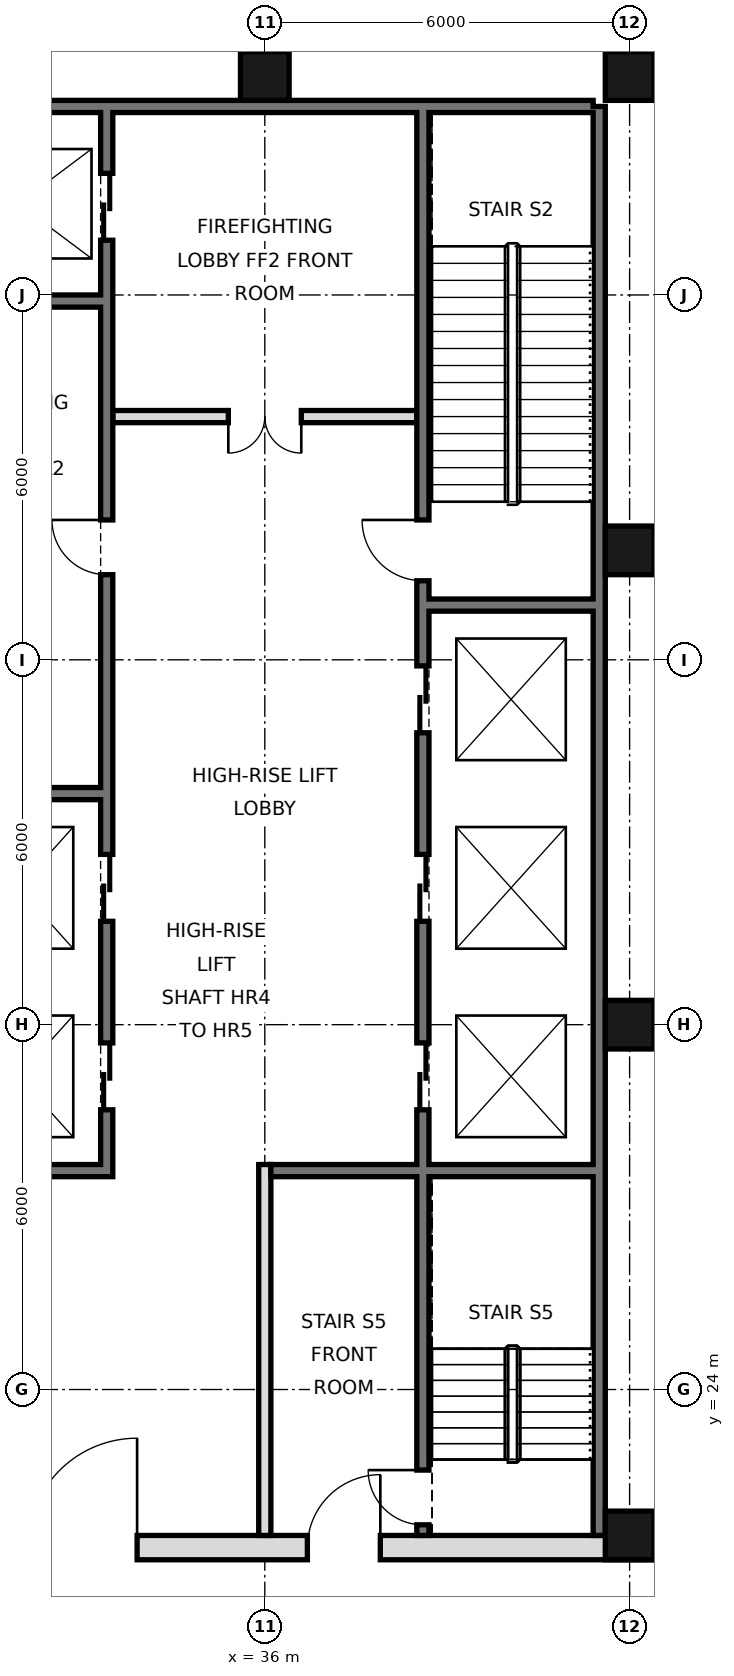
"""IFC4 building model, lengths in metres.
Left out: names, types, materials, properties, quantities, classifications, styles, units other than length and angle.
Written with IfcOpenShell. Run it as: python <this file> out.ifc"""

import sys

from ifc_helpers import new_model, si_unit, direction, frame, frame_2d, origin, origin_2d, place, context, subcontext, project, spatial, rectangle, hollow_rectangle, extrude, element, fill, save


model = new_model("IFC4")
c1 = context("Model", 3, precision=1e-05, world=origin(), true_north=direction((0.0, 1.0)))
c2 = subcontext(c1, "Body", "Model", "MODEL_VIEW")
j1 = project(units=[si_unit("LENGTHUNIT", "METRE"), si_unit("PLANEANGLEUNIT", "RADIAN")], contexts=[c1])
p1 = place(None, origin())
s1 = spatial("IfcSite", under=j1, at=p1, CompositionType="ELEMENT")
p2 = place(p1, origin())
s2 = spatial("IfcBuilding", under=s1, at=p2, CompositionType="ELEMENT")
p3 = place(p2, frame((0.0, 0.0, 257.6)))
s3 = spatial("IfcBuildingStorey", under=s2, at=p3, CompositionType="ELEMENT", Elevation=257.6)
for number, where, z_axis, x_axis in (
    (1, (36.0, 45.6, 0.0), (0.0, 0.0, 1.0), (1.0, 0.0, 0.0)),
    (2, (42.0, 21.6, 0.0), (0.0, 0.0, 1.0), (1.0, 0.0, 0.0)),
    (3, (42.0, 30.0, 0.0), (0.0, 0.0, 1.0), (1.0, 0.0, 0.0)),
    (4, (42.0, 37.8, 0.0), (0.0, 0.0, 1.0), (1.0, 0.0, 0.0)),
    (5, (42.0, 45.6, 0.0), (0.0, 0.0, 1.0), (1.0, 0.0, 0.0)),
):
    element("IfcColumn", number, at=place(p3, frame(where, z_axis=z_axis, x_axis=x_axis)), inside=s3, PredefinedType="COLUMN", context=c2, shape_type="SweptSolid", body=[
        extrude(hollow_rectangle(XDim=0.8, YDim=0.8, WallThickness=0.032, at=origin_2d()), origin(), (0.0, 0.0, 1.0), 5.4),
    ])
p4 = place(p3, frame((41.5, 21.6, 0.0), z_axis=(0.0, 0.0, 1.0), x_axis=(0.0, 1.0, 0.0)))
e6 = element("IfcWall", 6, at=p4, inside=s3, PredefinedType="SOLIDWALL", context=c2, shape_type="SweptSolid", body=[
    extrude(rectangle(XDim=23.5, YDim=0.2, at=frame_2d((11.75, 0.0))), origin(), (0.0, 0.0, 1.0), 5.22),
])
p5 = place(p3, frame((6.6, 45.1, 0.0), z_axis=(0.0, 0.0, 1.0), x_axis=(1.0, 0.0, 0.0)))
e7 = element("IfcWall", 7, at=p5, inside=s3, PredefinedType="SOLIDWALL", context=c2, shape_type="SweptSolid", body=[
    extrude(rectangle(XDim=34.8, YDim=0.2, at=frame_2d((17.4, 0.0))), origin(), (0.0, 0.0, 1.0), 5.22),
])
p6 = place(p3, frame((5.6, 21.4, 0.0), z_axis=(0.0, 0.0, 1.0), x_axis=(1.0, 0.0, 0.0)))
e8 = element("IfcWall", 8, at=p6, inside=s3, PredefinedType="SOLIDWALL", context=c2, shape_type="SweptSolid", body=[
    extrude(rectangle(XDim=36.8, YDim=0.4, at=frame_2d((18.4, 0.0))), origin(), (0.0, 0.0, 1.0), 5.22),
])
p7 = place(p6, frame((8.5, 0.0, 0.0)))
e9 = element("IfcOpeningElement", 9, at=p7, cuts=e8, PredefinedType="OPENING", context=c2, shape_type="SweptSolid", body=[
    extrude(rectangle(XDim=1.8, YDim=2.1, at=frame_2d((0.9, 1.05))), frame((0.0, 0.21, 0.0), z_axis=(0.0, -1.0, 0.0), x_axis=(1.0, 0.0, 0.0)), (0.0, 0.0, 1.0), 0.42),
])
p8 = place(p6, frame((17.5, 0.0, 0.0)))
e10 = element("IfcOpeningElement", 10, at=p8, cuts=e8, PredefinedType="OPENING", context=c2, shape_type="SweptSolid", body=[
    extrude(rectangle(XDim=1.8, YDim=2.1, at=frame_2d((0.9, 1.05))), frame((0.0, 0.21, 0.0), z_axis=(0.0, -1.0, 0.0), x_axis=(1.0, 0.0, 0.0)), (0.0, 0.0, 1.0), 0.42),
])
p9 = place(p6, frame((26.5, 0.0, 0.0)))
e11 = element("IfcOpeningElement", 11, at=p9, cuts=e8, PredefinedType="OPENING", context=c2, shape_type="SweptSolid", body=[
    extrude(rectangle(XDim=1.8, YDim=2.1, at=frame_2d((0.9, 1.05))), frame((0.0, 0.21, 0.0), z_axis=(0.0, -1.0, 0.0), x_axis=(1.0, 0.0, 0.0)), (0.0, 0.0, 1.0), 0.42),
])
p10 = place(p6, frame((4.5, 0.0, 0.0)))
e12 = element("IfcOpeningElement", 12, at=p10, cuts=e8, PredefinedType="OPENING", context=c2, shape_type="SweptSolid", body=[
    extrude(rectangle(XDim=1.2, YDim=2.1, at=frame_2d((0.6, 1.05))), frame((0.0, 0.21, 0.0), z_axis=(0.0, -1.0, 0.0), x_axis=(1.0, 0.0, 0.0)), (0.0, 0.0, 1.0), 0.42),
])
p11 = place(p6, frame((31.1, 0.0, 0.0)))
e13 = element("IfcOpeningElement", 13, at=p11, cuts=e8, PredefinedType="OPENING", context=c2, shape_type="SweptSolid", body=[
    extrude(rectangle(XDim=1.2, YDim=2.1, at=frame_2d((0.6, 1.05))), frame((0.0, 0.21, 0.0), z_axis=(0.0, -1.0, 0.0), x_axis=(1.0, 0.0, 0.0)), (0.0, 0.0, 1.0), 0.42),
])
p12 = place(p3, frame((33.4, 27.5, 0.0), z_axis=(0.0, 0.0, 1.0), x_axis=(0.0, 1.0, 0.0)))
e14 = element("IfcWall", 14, at=p12, inside=s3, PredefinedType="SOLIDWALL", context=c2, shape_type="SweptSolid", body=[
    extrude(rectangle(XDim=17.5, YDim=0.2, at=frame_2d((8.75, 0.0))), origin(), (0.0, 0.0, 1.0), 5.22),
])
p13 = place(p12, frame((1.1, 0.0, 0.0)))
e15 = element("IfcOpeningElement", 15, at=p13, cuts=e14, PredefinedType="OPENING", context=c2, shape_type="SweptSolid", body=[
    extrude(rectangle(XDim=1.1, YDim=2.1, at=frame_2d((0.55, 1.05))), frame((0.0, 0.11, 0.0), z_axis=(0.0, -1.0, 0.0), x_axis=(1.0, 0.0, 0.0)), (0.0, 0.0, 1.0), 0.22),
])
p14 = place(p12, frame((4.2, 0.0, 0.0)))
e16 = element("IfcOpeningElement", 16, at=p14, cuts=e14, PredefinedType="OPENING", context=c2, shape_type="SweptSolid", body=[
    extrude(rectangle(XDim=1.1, YDim=2.1, at=frame_2d((0.55, 1.05))), frame((0.0, 0.11, 0.0), z_axis=(0.0, -1.0, 0.0), x_axis=(1.0, 0.0, 0.0)), (0.0, 0.0, 1.0), 0.22),
])
p15 = place(p12, frame((15.4, 0.0, 0.0)))
e17 = element("IfcOpeningElement", 17, at=p15, cuts=e14, PredefinedType="OPENING", context=c2, shape_type="SweptSolid", body=[
    extrude(rectangle(XDim=1.1, YDim=2.1, at=frame_2d((0.55, 1.05))), frame((0.0, 0.11, 0.0), z_axis=(0.0, -1.0, 0.0), x_axis=(1.0, 0.0, 0.0)), (0.0, 0.0, 1.0), 0.22),
])
p16 = place(p12, frame((9.9, 0.0, 0.0)))
e18 = element("IfcOpeningElement", 18, at=p16, cuts=e14, PredefinedType="OPENING", context=c2, shape_type="SweptSolid", body=[
    extrude(rectangle(XDim=0.9, YDim=2.1, at=frame_2d((0.45, 1.05))), frame((0.0, 0.11, 0.0), z_axis=(0.0, -1.0, 0.0), x_axis=(1.0, 0.0, 0.0)), (0.0, 0.0, 1.0), 0.22),
])
p17 = place(p3, frame((36.0, 21.6, 0.0), z_axis=(0.0, 0.0, 1.0), x_axis=(0.0, 1.0, 0.0)))
e19 = element("IfcWall", 19, at=p17, inside=s3, PredefinedType="PARTITIONING", context=c2, shape_type="SweptSolid", body=[
    extrude(rectangle(XDim=6.1, YDim=0.2, at=frame_2d((3.05, 0.0))), origin(), (0.0, 0.0, 1.0), 5.22),
])
p18 = place(p3, frame((38.6, 21.6, 0.0), z_axis=(0.0, 0.0, 1.0), x_axis=(0.0, 1.0, 0.0)))
e20 = element("IfcWall", 20, at=p18, inside=s3, PredefinedType="SOLIDWALL", context=c2, shape_type="SweptSolid", body=[
    extrude(rectangle(XDim=23.4, YDim=0.2, at=frame_2d((11.7, 0.0))), origin(), (0.0, 0.0, 1.0), 5.22),
])
p19 = place(p18, frame((7.0, 0.0, 0.0)))
e21 = element("IfcOpeningElement", 21, at=p19, cuts=e20, PredefinedType="OPENING", context=c2, shape_type="SweptSolid", body=[
    extrude(rectangle(XDim=1.1, YDim=2.1, at=frame_2d((0.55, 1.05))), frame((0.0, 0.11, 0.0), z_axis=(0.0, -1.0, 0.0), x_axis=(1.0, 0.0, 0.0)), (0.0, 0.0, 1.0), 0.22),
])
p20 = place(p18, frame((10.1, 0.0, 0.0)))
e22 = element("IfcOpeningElement", 22, at=p20, cuts=e20, PredefinedType="OPENING", context=c2, shape_type="SweptSolid", body=[
    extrude(rectangle(XDim=1.1, YDim=2.1, at=frame_2d((0.55, 1.05))), frame((0.0, 0.11, 0.0), z_axis=(0.0, -1.0, 0.0), x_axis=(1.0, 0.0, 0.0)), (0.0, 0.0, 1.0), 0.22),
])
p21 = place(p18, frame((13.2, 0.0, 0.0)))
e23 = element("IfcOpeningElement", 23, at=p21, cuts=e20, PredefinedType="OPENING", context=c2, shape_type="SweptSolid", body=[
    extrude(rectangle(XDim=1.1, YDim=2.1, at=frame_2d((0.55, 1.05))), frame((0.0, 0.11, 0.0), z_axis=(0.0, -1.0, 0.0), x_axis=(1.0, 0.0, 0.0)), (0.0, 0.0, 1.0), 0.22),
])
p22 = place(p18, frame((15.7, 0.0, 0.0)))
e24 = element("IfcOpeningElement", 24, at=p22, cuts=e20, PredefinedType="OPENING", context=c2, shape_type="SweptSolid", body=[
    extrude(rectangle(XDim=1.0, YDim=2.1, at=frame_2d((0.5, 1.05))), frame((0.0, 0.11, 0.0), z_axis=(0.0, -1.0, 0.0), x_axis=(1.0, 0.0, 0.0)), (0.0, 0.0, 1.0), 0.22),
])
p23 = place(p18, frame((0.175, 0.0, 0.0)))
e25 = element("IfcOpeningElement", 25, at=p23, cuts=e20, PredefinedType="OPENING", context=c2, shape_type="SweptSolid", body=[
    extrude(rectangle(XDim=0.9, YDim=2.1, at=frame_2d((0.45, 1.05))), frame((0.0, 0.11, 0.0), z_axis=(0.0, -1.0, 0.0), x_axis=(1.0, 0.0, 0.0)), (0.0, 0.0, 1.0), 0.22),
])
p24 = place(p3, frame((30.6, 27.6, 0.0), z_axis=(0.0, 0.0, 1.0), x_axis=(1.0, 0.0, 0.0)))
e26 = element("IfcWall", 26, at=p24, inside=s3, PredefinedType="SOLIDWALL", context=c2, shape_type="SweptSolid", body=[
    extrude(rectangle(XDim=2.7, YDim=0.2, at=frame_2d((1.35, 0.0))), origin(), (0.0, 0.0, 1.0), 5.22),
])
p25 = place(p3, frame((36.1, 27.6, 0.0), z_axis=(0.0, 0.0, 1.0), x_axis=(1.0, 0.0, 0.0)))
e27 = element("IfcWall", 27, at=p25, inside=s3, PredefinedType="SOLIDWALL", context=c2, shape_type="SweptSolid", body=[
    extrude(rectangle(XDim=5.3, YDim=0.2, at=frame_2d((2.65, 0.0))), origin(), (0.0, 0.0, 1.0), 5.22),
])
for number, where, z_axis, x_axis in (
    (28, (30.6, 33.8, 0.0), (0.0, 0.0, 1.0), (1.0, 0.0, 0.0)),
    (29, (38.7, 36.9, 0.0), (0.0, 0.0, 1.0), (1.0, 0.0, 0.0)),
):
    element("IfcWall", number, at=place(p3, frame(where, z_axis=z_axis, x_axis=x_axis)), inside=s3, PredefinedType="SOLIDWALL", context=c2, shape_type="SweptSolid", body=[
        extrude(rectangle(XDim=2.7, YDim=0.2, at=frame_2d((1.35, 0.0))), origin(), (0.0, 0.0, 1.0), 5.22),
    ])
p26 = place(p3, frame((33.5, 40.0, 0.0), z_axis=(0.0, 0.0, 1.0), x_axis=(1.0, 0.0, 0.0)))
e30 = element("IfcWall", 30, at=p26, inside=s3, PredefinedType="PARTITIONING", context=c2, shape_type="SweptSolid", body=[
    extrude(rectangle(XDim=5.0, YDim=0.2, at=frame_2d((2.5, 0.0))), origin(), (0.0, 0.0, 1.0), 5.22),
])
p27 = place(p26, frame((1.9, 0.0, 0.0)))
e31 = element("IfcOpeningElement", 31, at=p27, cuts=e30, PredefinedType="OPENING", context=c2, shape_type="SweptSolid", body=[
    extrude(rectangle(XDim=1.2, YDim=2.1, at=frame_2d((0.6, 1.05))), frame((0.0, 0.11, 0.0), z_axis=(0.0, -1.0, 0.0), x_axis=(1.0, 0.0, 0.0)), (0.0, 0.0, 1.0), 0.22),
])
p28 = place(p3, frame((30.6, 41.9, 0.0), z_axis=(0.0, 0.0, 1.0), x_axis=(1.0, 0.0, 0.0)))
e32 = element("IfcWall", 32, at=p28, inside=s3, PredefinedType="SOLIDWALL", context=c2, shape_type="SweptSolid", body=[
    extrude(rectangle(XDim=2.7, YDim=0.2, at=frame_2d((1.35, 0.0))), origin(), (0.0, 0.0, 1.0), 5.22),
])
p29 = place(p9, frame((1.8, 0.0, 0.0), z_axis=(0.0, 0.0, 1.0), x_axis=(-1.0, 0.0, 0.0)))
e33 = element("IfcDoor", 33, at=p29, inside=s3, OperationType="SINGLE_SWING_LEFT", PredefinedType="DOOR", context=c2, shape_type="SweptSolid", body=[
    extrude(rectangle(XDim=1.8, YDim=2.1, at=frame_2d((0.9, 1.05))), frame((0.0, 0.025, 0.0), z_axis=(0.0, -1.0, 0.0), x_axis=(1.0, 0.0, 0.0)), (0.0, 0.0, 1.0), 0.05),
])
fill(e11, e33)
p30 = place(p11, frame((1.2, 0.0, 0.0), z_axis=(0.0, 0.0, 1.0), x_axis=(-1.0, 0.0, 0.0)))
e34 = element("IfcDoor", 34, at=p30, inside=s3, OperationType="SINGLE_SWING_LEFT", PredefinedType="DOOR", context=c2, shape_type="SweptSolid", body=[
    extrude(rectangle(XDim=1.2, YDim=2.1, at=frame_2d((0.6, 1.05))), frame((0.0, 0.025, 0.0), z_axis=(0.0, -1.0, 0.0), x_axis=(1.0, 0.0, 0.0)), (0.0, 0.0, 1.0), 0.05),
])
fill(e13, e34)
p31 = place(p27, frame((1.2, 0.0, 0.0), z_axis=(0.0, 0.0, 1.0), x_axis=(-1.0, 0.0, 0.0)))
e35 = element("IfcDoor", 35, at=p31, inside=s3, OperationType="DOUBLE_DOOR_SINGLE_SWING", PredefinedType="DOOR", context=c2, shape_type="SweptSolid", body=[
    extrude(rectangle(XDim=1.2, YDim=2.1, at=frame_2d((0.6, 1.05))), frame((0.0, 0.025, 0.0), z_axis=(0.0, -1.0, 0.0), x_axis=(1.0, 0.0, 0.0)), (0.0, 0.0, 1.0), 0.05),
])
fill(e31, e35)
p32 = place(p19, origin())
e36 = element("IfcDoor", 36, at=p32, inside=s3, OperationType="DOUBLE_DOOR_SLIDING", PredefinedType="DOOR", context=c2, shape_type="SweptSolid", body=[
    extrude(rectangle(XDim=1.1, YDim=2.1, at=frame_2d((0.55, 1.05))), frame((0.0, 0.025, 0.0), z_axis=(0.0, -1.0, 0.0), x_axis=(1.0, 0.0, 0.0)), (0.0, 0.0, 1.0), 0.05),
])
fill(e21, e36)
p33 = place(p20, origin())
e37 = element("IfcDoor", 37, at=p33, inside=s3, OperationType="DOUBLE_DOOR_SLIDING", PredefinedType="DOOR", context=c2, shape_type="SweptSolid", body=[
    extrude(rectangle(XDim=1.1, YDim=2.1, at=frame_2d((0.55, 1.05))), frame((0.0, 0.025, 0.0), z_axis=(0.0, -1.0, 0.0), x_axis=(1.0, 0.0, 0.0)), (0.0, 0.0, 1.0), 0.05),
])
fill(e22, e37)
p34 = place(p21, origin())
e38 = element("IfcDoor", 38, at=p34, inside=s3, OperationType="DOUBLE_DOOR_SLIDING", PredefinedType="DOOR", context=c2, shape_type="SweptSolid", body=[
    extrude(rectangle(XDim=1.1, YDim=2.1, at=frame_2d((0.55, 1.05))), frame((0.0, 0.025, 0.0), z_axis=(0.0, -1.0, 0.0), x_axis=(1.0, 0.0, 0.0)), (0.0, 0.0, 1.0), 0.05),
])
fill(e23, e38)
p35 = place(p13, origin())
e39 = element("IfcDoor", 39, at=p35, inside=s3, OperationType="DOUBLE_DOOR_SLIDING", PredefinedType="DOOR", context=c2, shape_type="SweptSolid", body=[
    extrude(rectangle(XDim=1.1, YDim=2.1, at=frame_2d((0.55, 1.05))), frame((0.0, 0.025, 0.0), z_axis=(0.0, -1.0, 0.0), x_axis=(1.0, 0.0, 0.0)), (0.0, 0.0, 1.0), 0.05),
])
fill(e15, e39)
p36 = place(p14, origin())
e40 = element("IfcDoor", 40, at=p36, inside=s3, OperationType="DOUBLE_DOOR_SLIDING", PredefinedType="DOOR", context=c2, shape_type="SweptSolid", body=[
    extrude(rectangle(XDim=1.1, YDim=2.1, at=frame_2d((0.55, 1.05))), frame((0.0, 0.025, 0.0), z_axis=(0.0, -1.0, 0.0), x_axis=(1.0, 0.0, 0.0)), (0.0, 0.0, 1.0), 0.05),
])
fill(e16, e40)
p37 = place(p15, origin())
e41 = element("IfcDoor", 41, at=p37, inside=s3, OperationType="DOUBLE_DOOR_SLIDING", PredefinedType="DOOR", context=c2, shape_type="SweptSolid", body=[
    extrude(rectangle(XDim=1.1, YDim=2.1, at=frame_2d((0.55, 1.05))), frame((0.0, 0.025, 0.0), z_axis=(0.0, -1.0, 0.0), x_axis=(1.0, 0.0, 0.0)), (0.0, 0.0, 1.0), 0.05),
])
fill(e17, e41)
p38 = place(p22, frame((1.0, 0.0, 0.0), z_axis=(0.0, 0.0, 1.0), x_axis=(-1.0, 0.0, 0.0)))
e42 = element("IfcDoor", 42, at=p38, inside=s3, OperationType="SINGLE_SWING_LEFT", PredefinedType="DOOR", context=c2, shape_type="SweptSolid", body=[
    extrude(rectangle(XDim=1.0, YDim=2.1, at=frame_2d((0.5, 1.05))), frame((0.0, 0.025, 0.0), z_axis=(0.0, -1.0, 0.0), x_axis=(1.0, 0.0, 0.0)), (0.0, 0.0, 1.0), 0.05),
])
fill(e24, e42)
p39 = place(p23, frame((0.9, 0.0, 0.0), z_axis=(0.0, 0.0, 1.0), x_axis=(-1.0, 0.0, 0.0)))
e43 = element("IfcDoor", 43, at=p39, inside=s3, OperationType="SINGLE_SWING_LEFT", PredefinedType="DOOR", context=c2, shape_type="SweptSolid", body=[
    extrude(rectangle(XDim=0.9, YDim=2.1, at=frame_2d((0.45, 1.05))), frame((0.0, 0.025, 0.0), z_axis=(0.0, -1.0, 0.0), x_axis=(1.0, 0.0, 0.0)), (0.0, 0.0, 1.0), 0.05),
])
fill(e25, e43)
p40 = place(p16, frame((0.9, 0.0, 0.0), z_axis=(0.0, 0.0, 1.0), x_axis=(-1.0, 0.0, 0.0)))
e44 = element("IfcDoor", 44, at=p40, inside=s3, OperationType="SINGLE_SWING_LEFT", PredefinedType="DOOR", context=c2, shape_type="SweptSolid", body=[
    extrude(rectangle(XDim=0.9, YDim=2.1, at=frame_2d((0.45, 1.05))), frame((0.0, 0.025, 0.0), z_axis=(0.0, -1.0, 0.0), x_axis=(1.0, 0.0, 0.0)), (0.0, 0.0, 1.0), 0.05),
])
fill(e18, e44)
save(model, sys.argv[1])
